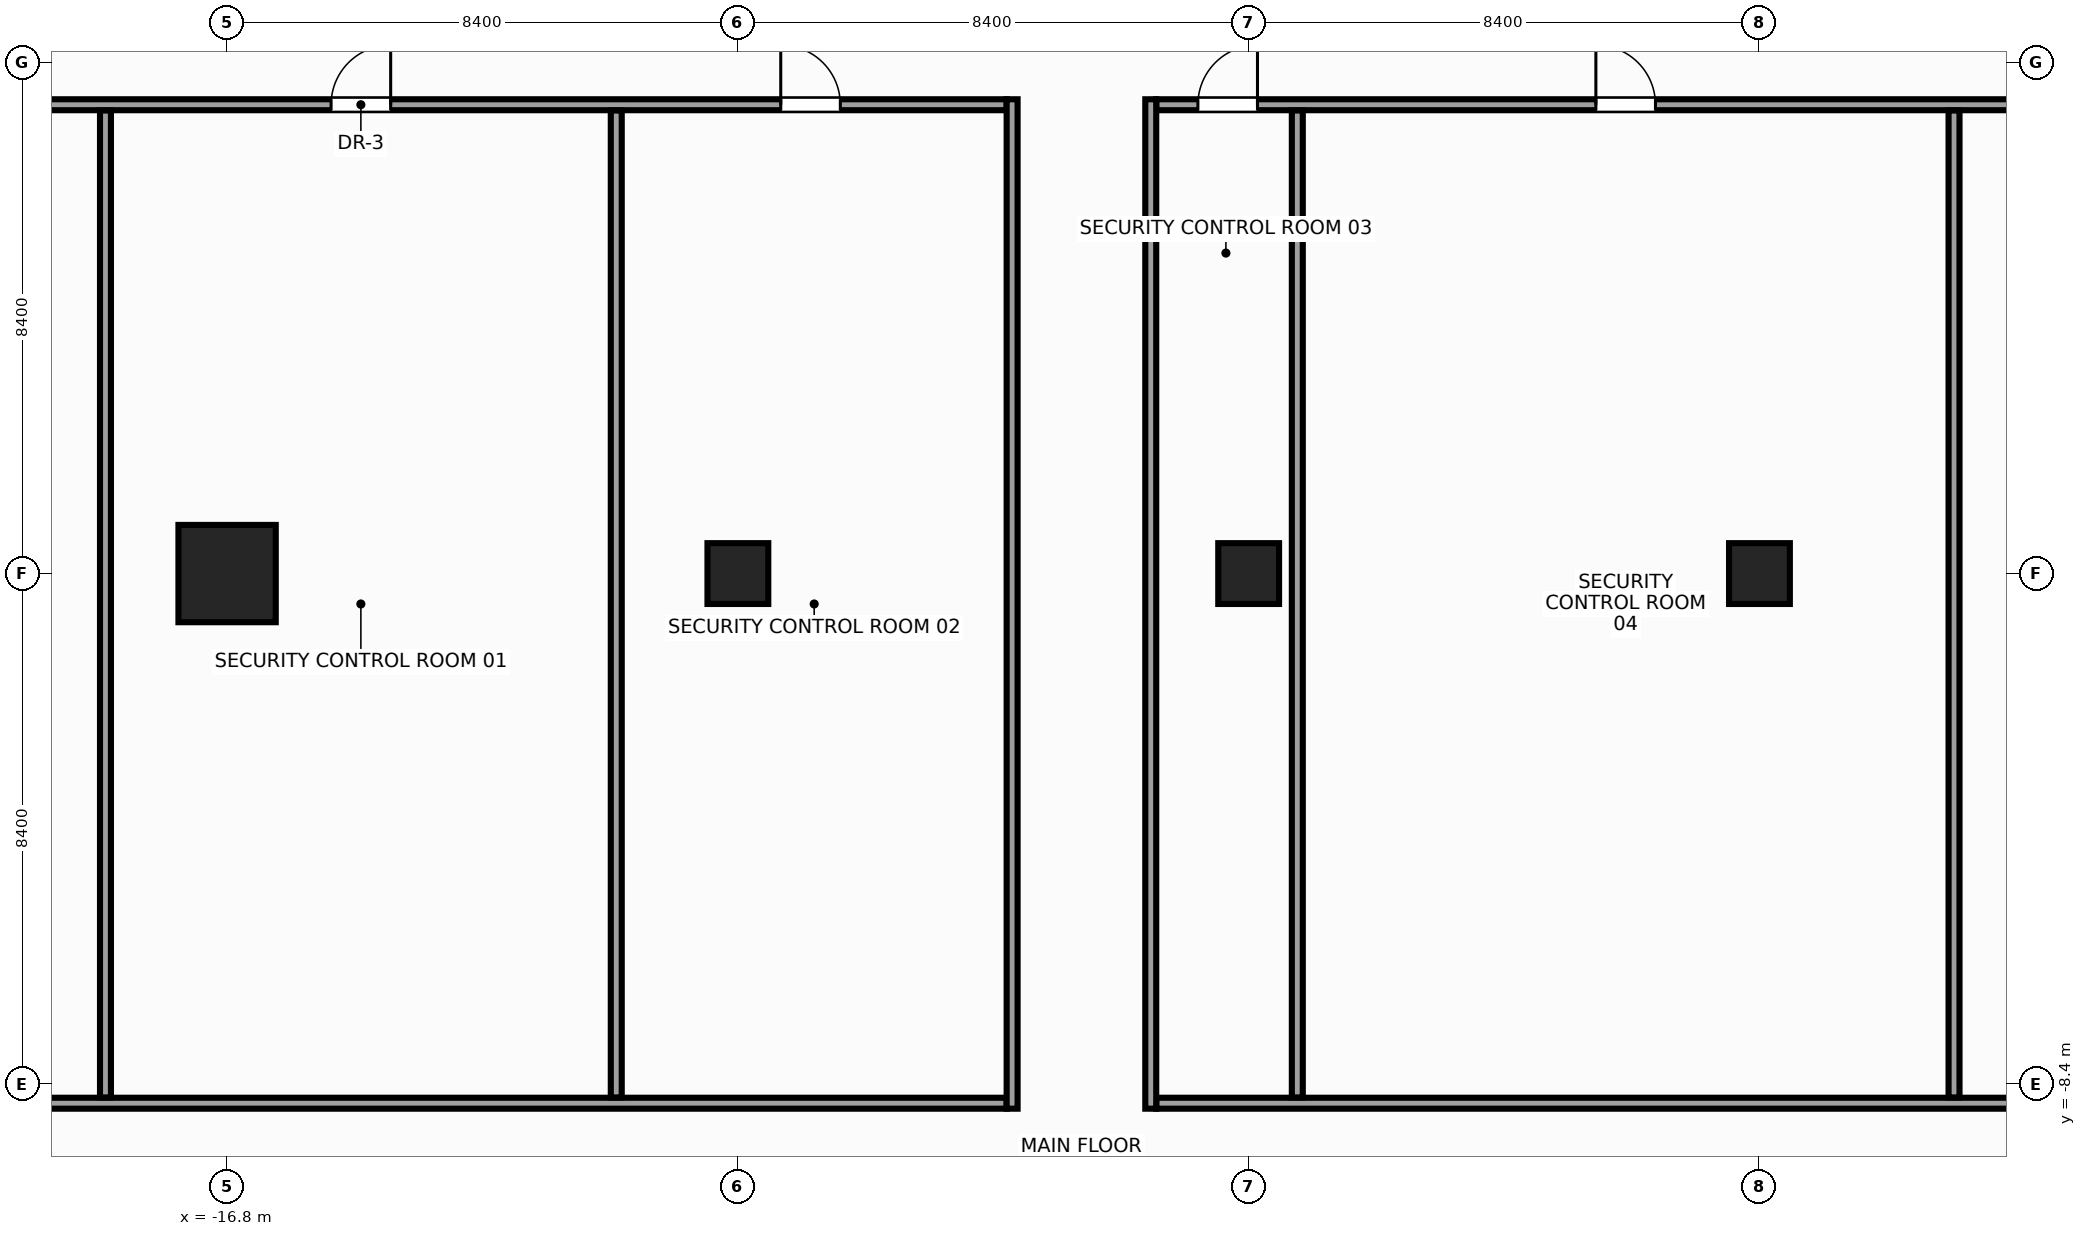
"""IFC4 building model, lengths in metres.
Left out: names, types, materials, properties, quantities, classifications, styles, units other than length and angle.
Written with IfcOpenShell. Run it as: python <this file> out.ifc"""

import sys

from ifc_helpers import new_model, si_unit, direction, frame, frame_2d, origin, origin_with_axes, origin_2d, place, context, subcontext, project, spatial, rectangle, hollow_rectangle, extrude, source, transform, mapped, element, fill, save


model = new_model("IFC4")
c1 = context("Model", 3, precision=1e-05, world=origin(), true_north=direction((0.0, 1.0)))
c2 = subcontext(c1, "Body", "Model", "MODEL_VIEW")
j1 = project(units=[si_unit("LENGTHUNIT", "METRE"), si_unit("PLANEANGLEUNIT", "RADIAN")], contexts=[c1])
p1 = place(None, origin())
s1 = spatial("IfcSite", under=j1, at=p1, CompositionType="ELEMENT")
p2 = place(p1, origin())
s2 = spatial("IfcBuilding", under=s1, at=p2, CompositionType="ELEMENT")
p3 = place(p2, frame((0.0, 0.0, 113.6)))
s3 = spatial("IfcBuildingStorey", under=s2, at=p3, CompositionType="ELEMENT", Elevation=113.6)
m1 = source(origin(), c2, "Body", "SweptSolid", [
    extrude(rectangle(XDim=1.6, YDim=1.6, at=origin_2d()), origin(), (0.0, 0.0, 1.0), 3.6),
])
p4 = place(p3, frame((-16.8, 0.0, 0.0), z_axis=(0.0, 0.0, 1.0), x_axis=(1.0, 0.0, 0.0)))
e1 = element("IfcColumn", 1, at=p4, inside=s3, PredefinedType="COLUMN", context=c2, shape_type="MappedRepresentation", body=[
    mapped(m1, transform((0.0, 0.0, 0.0), x_axis=(1.0, 0.0, 0.0), y_axis=(0.0, 1.0, 0.0), z_axis=(0.0, 0.0, 1.0), scale=1.0)),
])
m2 = source(origin(), c2, "Body", "SweptSolid", [
    extrude(hollow_rectangle(XDim=1.0, YDim=1.0, WallThickness=0.045, at=origin_2d()), origin(), (0.0, 0.0, 1.0), 3.6),
])
for number, where, z_axis, x_axis in (
    (2, (-8.4, 0.0, 0.0), (0.0, 0.0, 1.0), (1.0, 0.0, 0.0)),
    (3, (8.4, 0.0, 0.0), (0.0, 0.0, 1.0), (1.0, 0.0, 0.0)),
):
    element("IfcColumn", number, at=place(p3, frame(where, z_axis=z_axis, x_axis=x_axis)), inside=s3, PredefinedType="COLUMN", context=c2, shape_type="MappedRepresentation", body=[
        mapped(m2, transform((0.0, 0.0, 0.0), x_axis=(1.0, 0.0, 0.0), y_axis=(0.0, 1.0, 0.0), z_axis=(0.0, 0.0, 1.0), scale=1.0)),
    ])
m3 = source(origin(), c2, "Body", "SweptSolid", [
    extrude(rectangle(XDim=1.0, YDim=1.0, at=origin_2d()), origin(), (0.0, 0.0, 1.0), 3.6),
])
p5 = place(p3, origin_with_axes())
e4 = element("IfcColumn", 4, at=p5, inside=s3, PredefinedType="COLUMN", context=c2, shape_type="MappedRepresentation", body=[
    mapped(m3, transform((0.0, 0.0, 0.0), x_axis=(1.0, 0.0, 0.0), y_axis=(0.0, 1.0, 0.0), z_axis=(0.0, 0.0, 1.0), scale=1.0)),
])
m4 = source(origin(), c2, "Body", "SweptSolid", [
    extrude(rectangle(XDim=16.8, YDim=0.18, at=frame_2d((8.4, 0.0))), origin(), (0.0, 0.0, 1.0), 2.745),
])
p6 = place(p3, frame((-20.78, 7.71, 0.0), z_axis=(0.0, 0.0, 1.0), x_axis=(1.0, 0.0, 0.0)))
e5 = element("IfcWall", 5, at=p6, inside=s3, PredefinedType="PARTITIONING", context=c2, shape_type="MappedRepresentation", body=[
    mapped(m4, transform((0.0, 0.0, 0.0), x_axis=(1.0, 0.0, 0.0), y_axis=(0.0, 1.0, 0.0), z_axis=(0.0, 0.0, 1.0), scale=1.0)),
])
p7 = place(p6, frame((5.69, 0.0, 0.0)))
e6 = element("IfcOpeningElement", 6, at=p7, cuts=e5, PredefinedType="OPENING", context=c2, shape_type="SweptSolid", body=[
    extrude(rectangle(XDim=0.98, YDim=2.15, at=frame_2d((0.49, 1.075))), frame((0.0, 0.102, 0.0), z_axis=(0.0, -1.0, 0.0), x_axis=(1.0, 0.0, 0.0)), (0.0, 0.0, 1.0), 0.204),
])
p8 = place(p6, frame((13.085, 0.0, 0.0)))
e7 = element("IfcOpeningElement", 7, at=p8, cuts=e5, PredefinedType="OPENING", context=c2, shape_type="SweptSolid", body=[
    extrude(rectangle(XDim=0.98, YDim=2.15, at=frame_2d((0.49, 1.075))), frame((0.0, 0.102, 0.0), z_axis=(0.0, -1.0, 0.0), x_axis=(1.0, 0.0, 0.0)), (0.0, 0.0, 1.0), 0.204),
])
m5 = source(origin(), c2, "Body", "SweptSolid", [
    extrude(rectangle(XDim=22.3, YDim=0.18, at=frame_2d((11.15, 0.0))), origin(), (0.0, 0.0, 1.0), 2.745),
])
p9 = place(p3, frame((-1.52, 7.71, 0.0), z_axis=(0.0, 0.0, 1.0), x_axis=(1.0, 0.0, 0.0)))
e8 = element("IfcWall", 8, at=p9, inside=s3, PredefinedType="PARTITIONING", context=c2, shape_type="MappedRepresentation", body=[
    mapped(m5, transform((0.0, 0.0, 0.0), x_axis=(1.0, 0.0, 0.0), y_axis=(0.0, 1.0, 0.0), z_axis=(0.0, 0.0, 1.0), scale=1.0)),
])
p10 = place(p9, frame((0.685, 0.0, 0.0)))
e9 = element("IfcOpeningElement", 9, at=p10, cuts=e8, PredefinedType="OPENING", context=c2, shape_type="SweptSolid", body=[
    extrude(rectangle(XDim=0.98, YDim=2.15, at=frame_2d((0.49, 1.075))), frame((0.0, 0.102, 0.0), z_axis=(0.0, -1.0, 0.0), x_axis=(1.0, 0.0, 0.0)), (0.0, 0.0, 1.0), 0.204),
])
p11 = place(p9, frame((7.23, 0.0, 0.0)))
e10 = element("IfcOpeningElement", 10, at=p11, cuts=e8, PredefinedType="OPENING", context=c2, shape_type="SweptSolid", body=[
    extrude(rectangle(XDim=0.98, YDim=2.15, at=frame_2d((0.49, 1.075))), frame((0.0, 0.102, 0.0), z_axis=(0.0, -1.0, 0.0), x_axis=(1.0, 0.0, 0.0)), (0.0, 0.0, 1.0), 0.204),
])
p12 = place(p9, frame((17.195, 0.0, 0.0)))
e11 = element("IfcOpeningElement", 11, at=p12, cuts=e8, PredefinedType="OPENING", context=c2, shape_type="SweptSolid", body=[
    extrude(rectangle(XDim=0.98, YDim=2.15, at=frame_2d((0.49, 1.075))), frame((0.0, 0.102, 0.0), z_axis=(0.0, -1.0, 0.0), x_axis=(1.0, 0.0, 0.0)), (0.0, 0.0, 1.0), 0.204),
])
p13 = place(p3, frame((-20.78, -8.71, 0.0), z_axis=(0.0, 0.0, 1.0), x_axis=(1.0, 0.0, 0.0)))
e12 = element("IfcWall", 12, at=p13, inside=s3, PredefinedType="PARTITIONING", context=c2, shape_type="MappedRepresentation", body=[
    mapped(m4, transform((0.0, 0.0, 0.0), x_axis=(1.0, 0.0, 0.0), y_axis=(0.0, 1.0, 0.0), z_axis=(0.0, 0.0, 1.0), scale=1.0)),
])
p14 = place(p3, frame((-1.52, -8.71, 0.0), z_axis=(0.0, 0.0, 1.0), x_axis=(1.0, 0.0, 0.0)))
e13 = element("IfcWall", 13, at=p14, inside=s3, PredefinedType="PARTITIONING", context=c2, shape_type="MappedRepresentation", body=[
    mapped(m5, transform((0.0, 0.0, 0.0), x_axis=(1.0, 0.0, 0.0), y_axis=(0.0, 1.0, 0.0), z_axis=(0.0, 0.0, 1.0), scale=1.0)),
])
m6 = source(origin(), c2, "Body", "SweptSolid", [
    extrude(rectangle(XDim=16.6, YDim=0.18, at=frame_2d((8.3, 0.0))), origin(), (0.0, 0.0, 1.0), 2.645),
])
for number, where, z_axis, x_axis in (
    (14, (-3.89, -8.8, 0.0), (0.0, 0.0, 1.0), (0.0, 1.0, 0.0)),
    (15, (-1.61, -8.8, 0.0), (0.0, 0.0, 1.0), (0.0, 1.0, 0.0)),
):
    element("IfcWall", number, at=place(p3, frame(where, z_axis=z_axis, x_axis=x_axis)), inside=s3, PredefinedType="PARTITIONING", context=c2, shape_type="MappedRepresentation", body=[
        mapped(m6, transform((0.0, 0.0, 0.0), x_axis=(1.0, 0.0, 0.0), y_axis=(0.0, 1.0, 0.0), z_axis=(0.0, 0.0, 1.0), scale=1.0)),
    ])
m7 = source(origin(), c2, "Body", "SweptSolid", [
    extrude(rectangle(XDim=16.23, YDim=0.18, at=frame_2d((8.115, 0.0))), origin(), (0.0, 0.0, 1.0), 2.745),
])
p15 = place(p3, frame((-18.8, -8.615, 0.0), z_axis=(0.0, 0.0, 1.0), x_axis=(0.0, 1.0, 0.0)))
e16 = element("IfcWall", 16, at=p15, inside=s3, PredefinedType="PARTITIONING", context=c2, shape_type="MappedRepresentation", body=[
    mapped(m7, transform((0.0, 0.0, 0.0), x_axis=(1.0, 0.0, 0.0), y_axis=(0.0, 1.0, 0.0), z_axis=(0.0, 0.0, 1.0), scale=1.0)),
])
m8 = source(origin(), c2, "Body", "SweptSolid", [
    extrude(rectangle(XDim=16.23, YDim=0.18, at=frame_2d((8.115, 0.0))), origin(), (0.0, 0.0, 1.0), 2.645),
])
for number, where, z_axis, x_axis in (
    (17, (-10.4, -8.615, 0.0), (0.0, 0.0, 1.0), (0.0, 1.0, 0.0)),
    (18, (0.8, -8.615, 0.0), (0.0, 0.0, 1.0), (0.0, 1.0, 0.0)),
    (19, (11.6, -8.615, 0.0), (0.0, 0.0, 1.0), (0.0, 1.0, 0.0)),
):
    element("IfcWall", number, at=place(p3, frame(where, z_axis=z_axis, x_axis=x_axis)), inside=s3, PredefinedType="PARTITIONING", context=c2, shape_type="MappedRepresentation", body=[
        mapped(m8, transform((0.0, 0.0, 0.0), x_axis=(1.0, 0.0, 0.0), y_axis=(0.0, 1.0, 0.0), z_axis=(0.0, 0.0, 1.0), scale=1.0)),
    ])
m9 = source(origin(), c2, "Body", "SweptSolid", [
    extrude(rectangle(XDim=0.98, YDim=2.15, at=frame_2d((0.49, 1.075))), frame((0.0, 0.025, 0.0), z_axis=(0.0, -1.0, 0.0), x_axis=(1.0, 0.0, 0.0)), (0.0, 0.0, 1.0), 0.05),
])
p16 = place(p7, origin())
e20 = element("IfcDoor", 20, at=p16, inside=s3, OperationType="SINGLE_SWING_RIGHT", PredefinedType="DOOR", context=c2, shape_type="MappedRepresentation", body=[
    mapped(m9, transform((0.0, 0.0, 0.0), x_axis=(1.0, 0.0, 0.0), y_axis=(0.0, 1.0, 0.0), z_axis=(0.0, 0.0, 1.0), scale=1.0)),
])
fill(e6, e20)
p17 = place(p8, origin())
e21 = element("IfcDoor", 21, at=p17, inside=s3, OperationType="SINGLE_SWING_LEFT", PredefinedType="DOOR", context=c2, shape_type="MappedRepresentation", body=[
    mapped(m9, transform((0.0, 0.0, 0.0), x_axis=(1.0, 0.0, 0.0), y_axis=(0.0, 1.0, 0.0), z_axis=(0.0, 0.0, 1.0), scale=1.0)),
])
fill(e7, e21)
p18 = place(p10, origin())
e22 = element("IfcDoor", 22, at=p18, inside=s3, OperationType="SINGLE_SWING_RIGHT", PredefinedType="DOOR", context=c2, shape_type="MappedRepresentation", body=[
    mapped(m9, transform((0.0, 0.0, 0.0), x_axis=(1.0, 0.0, 0.0), y_axis=(0.0, 1.0, 0.0), z_axis=(0.0, 0.0, 1.0), scale=1.0)),
])
fill(e9, e22)
p19 = place(p11, origin())
e23 = element("IfcDoor", 23, at=p19, inside=s3, OperationType="SINGLE_SWING_LEFT", PredefinedType="DOOR", context=c2, shape_type="MappedRepresentation", body=[
    mapped(m9, transform((0.0, 0.0, 0.0), x_axis=(1.0, 0.0, 0.0), y_axis=(0.0, 1.0, 0.0), z_axis=(0.0, 0.0, 1.0), scale=1.0)),
])
fill(e10, e23)
save(model, sys.argv[1])
